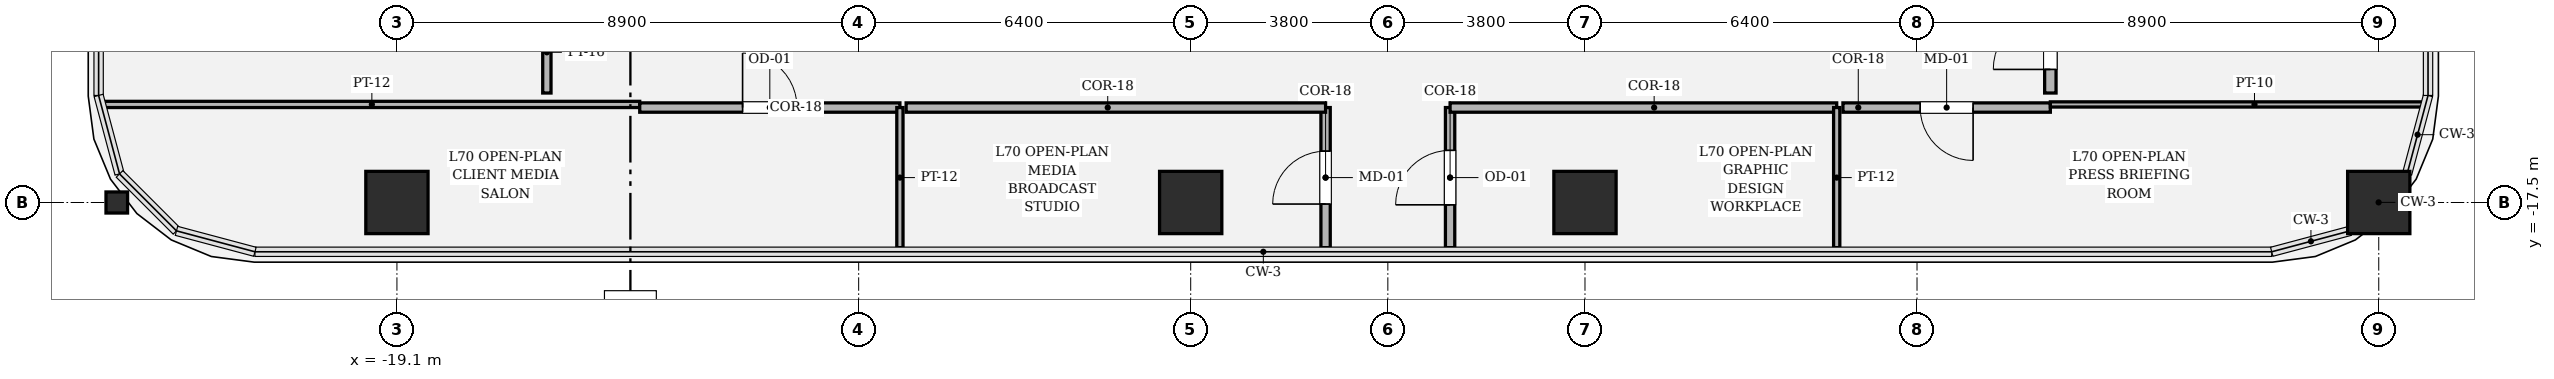
"""IFC4 building model, lengths in metres.
Left out: names, types, materials, properties, quantities, classifications, styles, units other than length and angle.
Written with IfcOpenShell. Run it as: python <this file> out.ifc"""

import sys

from ifc_helpers import new_model, si_unit, direction, frame, frame_2d, origin, origin_2d, place, context, subcontext, project, spatial, rectangle, hollow_rectangle, i_section, extrude, element, fill, save


model = new_model("IFC4")
c1 = context("Model", 3, precision=1e-05, world=origin(), true_north=direction((0.0, 1.0)))
c2 = subcontext(c1, "Body", "Model", "MODEL_VIEW")
j1 = project(units=[si_unit("LENGTHUNIT", "METRE"), si_unit("PLANEANGLEUNIT", "RADIAN")], contexts=[c1])
p1 = place(None, origin())
s1 = spatial("IfcSite", under=j1, at=p1, CompositionType="ELEMENT")
p2 = place(p1, origin())
s2 = spatial("IfcBuilding", under=s1, at=p2, CompositionType="ELEMENT")
p3 = place(p2, frame((0.0, 0.0, 296.4)))
s3 = spatial("IfcBuildingStorey", under=s2, at=p3, CompositionType="ELEMENT", Elevation=296.4)
for number, where, z_axis, x_axis in (
    (1, (-19.1, -17.5, 0.0), (0.0, 0.0, 1.0), (1.0, 0.0, 0.0)),
    (2, (-3.8, -17.5, 0.0), (0.0, 0.0, 1.0), (1.0, 0.0, 0.0)),
    (3, (3.8, -17.5, 0.0), (0.0, 0.0, 1.0), (1.0, 0.0, 0.0)),
    (4, (19.1, -17.5, 0.0), (0.0, 0.0, 1.0), (1.0, 0.0, 0.0)),
):
    element("IfcColumn", number, at=place(p3, frame(where, z_axis=z_axis, x_axis=x_axis)), inside=s3, PredefinedType="COLUMN", context=c2, shape_type="SweptSolid", body=[
        extrude(hollow_rectangle(XDim=1.2, YDim=1.2, WallThickness=0.035, at=origin_2d()), origin(), (0.0, 0.0, 1.0), 4.2),
    ])
p4 = place(p3, frame((-24.5, -17.5, 0.0), z_axis=(0.0, 0.0, 1.0), x_axis=(0.0, 1.0, 0.0)))
e5 = element("IfcColumn", 5, at=p4, inside=s3, PredefinedType="COLUMN", context=c2, shape_type="SweptSolid", body=[
    extrude(i_section(OverallWidth=0.406, OverallDepth=0.416, WebThickness=0.029, FlangeThickness=0.048, FilletRadius=0.018, at=origin_2d()), origin(), (0.0, 0.0, 1.0), 4.198),
])
p5 = place(p3, frame((-24.747, -15.61, 0.0), z_axis=(0.0, 0.0, 1.0), x_axis=(1.0, 0.0, 0.0)))
e6 = element("IfcWall", 6, at=p5, inside=s3, PredefinedType="PARTITIONING", context=c2, shape_type="SweptSolid", body=[
    extrude(rectangle(XDim=10.327, YDim=0.12, at=frame_2d((5.163, 0.0))), origin(), (0.0, 0.0, 1.0), 2.714),
])
p6 = place(p3, frame((-14.42, -15.67, 0.0), z_axis=(0.0, 0.0, 1.0), x_axis=(1.0, 0.0, 0.0)))
e7 = element("IfcWall", 7, at=p6, inside=s3, PredefinedType="PARTITIONING", context=c2, shape_type="SweptSolid", body=[
    extrude(rectangle(XDim=5.015, YDim=0.18, at=frame_2d((2.507, 0.0))), origin(), (0.0, 0.0, 1.0), 3.394),
])
p7 = place(p6, frame((1.982, 0.0, 0.0)))
e8 = element("IfcOpeningElement", 8, at=p7, cuts=e7, PredefinedType="OPENING", context=c2, shape_type="SweptSolid", body=[
    extrude(rectangle(XDim=1.05, YDim=2.2, at=frame_2d((0.525, 1.1))), frame((0.0, 0.1, 0.0), z_axis=(0.0, -1.0, 0.0), x_axis=(1.0, 0.0, 0.0)), (0.0, 0.0, 1.0), 0.2),
])
p8 = place(p3, frame((-9.405, -15.67, 0.0), z_axis=(0.0, 0.0, 1.0), x_axis=(0.0, -1.0, 0.0)))
e9 = element("IfcWall", 9, at=p8, inside=s3, PredefinedType="PARTITIONING", context=c2, shape_type="SweptSolid", body=[
    extrude(rectangle(XDim=2.7, YDim=0.12, at=frame_2d((1.35, 0.0))), origin(), (0.0, 0.0, 1.0), 3.394),
])
p9 = place(p3, frame((-1.2, -15.67, 0.0), z_axis=(0.0, 0.0, 1.0), x_axis=(0.0, -1.0, 0.0)))
e10 = element("IfcWall", 10, at=p9, inside=s3, PredefinedType="PARTITIONING", context=c2, shape_type="SweptSolid", body=[
    extrude(rectangle(XDim=2.7, YDim=0.18, at=frame_2d((1.35, 0.0))), origin(), (0.0, 0.0, 1.0), 3.394),
])
p10 = place(p9, frame((0.84, 0.0, 0.0)))
e11 = element("IfcOpeningElement", 11, at=p10, cuts=e10, PredefinedType="OPENING", context=c2, shape_type="SweptSolid", body=[
    extrude(rectangle(XDim=1.02, YDim=2.2, at=frame_2d((0.51, 1.1))), frame((0.0, 0.1, 0.0), z_axis=(0.0, -1.0, 0.0), x_axis=(1.0, 0.0, 0.0)), (0.0, 0.0, 1.0), 0.2),
])
p11 = place(p3, frame((-9.285, -15.67, 0.0), z_axis=(0.0, 0.0, 1.0), x_axis=(1.0, 0.0, 0.0)))
e12 = element("IfcWall", 12, at=p11, inside=s3, PredefinedType="PARTITIONING", context=c2, shape_type="SweptSolid", body=[
    extrude(rectangle(XDim=8.085, YDim=0.18, at=frame_2d((4.042, 0.0))), origin(), (0.0, 0.0, 1.0), 3.394),
])
p12 = place(p3, frame((1.2, -18.37, 0.0), z_axis=(0.0, 0.0, 1.0), x_axis=(0.0, 1.0, 0.0)))
e13 = element("IfcWall", 13, at=p12, inside=s3, PredefinedType="PARTITIONING", context=c2, shape_type="SweptSolid", body=[
    extrude(rectangle(XDim=2.7, YDim=0.18, at=frame_2d((1.35, 0.0))), origin(), (0.0, 0.0, 1.0), 3.394),
])
p13 = place(p12, frame((0.825, 0.0, 0.0)))
e14 = element("IfcOpeningElement", 14, at=p13, cuts=e13, PredefinedType="OPENING", context=c2, shape_type="SweptSolid", body=[
    extrude(rectangle(XDim=1.05, YDim=2.2, at=frame_2d((0.525, 1.1))), frame((0.0, 0.1, 0.0), z_axis=(0.0, -1.0, 0.0), x_axis=(1.0, 0.0, 0.0)), (0.0, 0.0, 1.0), 0.2),
])
p14 = place(p3, frame((1.2, -15.67, 0.0), z_axis=(0.0, 0.0, 1.0), x_axis=(1.0, 0.0, 0.0)))
e15 = element("IfcWall", 15, at=p14, inside=s3, PredefinedType="PARTITIONING", context=c2, shape_type="SweptSolid", body=[
    extrude(rectangle(XDim=7.452, YDim=0.18, at=frame_2d((3.726, 0.0))), origin(), (0.0, 0.0, 1.0), 3.394),
])
p15 = place(p3, frame((8.652, -15.67, 0.0), z_axis=(0.0, 0.0, 1.0), x_axis=(0.0, -1.0, 0.0)))
e16 = element("IfcWall", 16, at=p15, inside=s3, PredefinedType="PARTITIONING", context=c2, shape_type="SweptSolid", body=[
    extrude(rectangle(XDim=2.7, YDim=0.12, at=frame_2d((1.35, 0.0))), origin(), (0.0, 0.0, 1.0), 3.394),
])
p16 = place(p3, frame((8.772, -15.67, 0.0), z_axis=(0.0, 0.0, 1.0), x_axis=(1.0, 0.0, 0.0)))
e17 = element("IfcWall", 17, at=p16, inside=s3, PredefinedType="PARTITIONING", context=c2, shape_type="SweptSolid", body=[
    extrude(rectangle(XDim=3.998, YDim=0.18, at=frame_2d((1.999, 0.0))), origin(), (0.0, 0.0, 1.0), 3.394),
])
p17 = place(p16, frame((1.489, 0.0, 0.0)))
e18 = element("IfcOpeningElement", 18, at=p17, cuts=e17, PredefinedType="OPENING", context=c2, shape_type="SweptSolid", body=[
    extrude(rectangle(XDim=1.02, YDim=2.2, at=frame_2d((0.51, 1.1))), frame((0.0, 0.1, 0.0), z_axis=(0.0, -1.0, 0.0), x_axis=(1.0, 0.0, 0.0)), (0.0, 0.0, 1.0), 0.2),
])
p18 = place(p3, frame((12.77, -15.61, 0.0), z_axis=(0.0, 0.0, 1.0), x_axis=(1.0, 0.0, 0.0)))
e19 = element("IfcWall", 19, at=p18, inside=s3, PredefinedType="PARTITIONING", context=c2, shape_type="SweptSolid", body=[
    extrude(rectangle(XDim=7.177, YDim=0.1, at=frame_2d((3.588, 0.0))), origin(), (0.0, 0.0, 1.0), 3.394),
])
p19 = place(p3, frame((-16.21, -13.82, 0.0), z_axis=(0.0, 0.0, 1.0), x_axis=(0.0, -1.0, 0.0)))
e20 = element("IfcWall", 20, at=p19, inside=s3, PredefinedType="PARTITIONING", context=c2, shape_type="SweptSolid", body=[
    extrude(rectangle(XDim=1.57, YDim=0.16, at=frame_2d((0.785, 0.0))), origin(), (0.0, 0.0, 1.0), 4.0),
])
p20 = place(p3, frame((12.77, -15.39, 0.0), z_axis=(0.0, 0.0, 1.0), x_axis=(0.0, 1.0, 0.0)))
e21 = element("IfcWall", 21, at=p20, inside=s3, PredefinedType="SOLIDWALL", context=c2, shape_type="SweptSolid", body=[
    extrude(rectangle(XDim=2.01, YDim=0.22, at=frame_2d((1.005, 0.0))), origin(), (0.0, 0.0, 1.0), 3.634),
])
p21 = place(p20, frame((0.455, 0.0, 0.0)))
e22 = element("IfcOpeningElement", 22, at=p21, cuts=e21, PredefinedType="OPENING", context=c2, shape_type="SweptSolid", body=[
    extrude(rectangle(XDim=1.1, YDim=2.2, at=frame_2d((0.55, 1.1))), frame((0.0, 0.12, 0.0), z_axis=(0.0, -1.0, 0.0), x_axis=(1.0, 0.0, 0.0)), (0.0, 0.0, 1.0), 0.24),
])
p22 = place(p7, origin())
e23 = element("IfcDoor", 23, at=p22, inside=s3, OperationType="SINGLE_SWING_LEFT", PredefinedType="DOOR", context=c2, shape_type="SweptSolid", body=[
    extrude(rectangle(XDim=1.05, YDim=2.2, at=frame_2d((0.525, 1.1))), frame((0.0, 0.025, 0.0), z_axis=(0.0, -1.0, 0.0), x_axis=(1.0, 0.0, 0.0)), (0.0, 0.0, 1.0), 0.05),
])
fill(e8, e23)
p23 = place(p10, origin())
e24 = element("IfcDoor", 24, at=p23, inside=s3, OperationType="SINGLE_SWING_RIGHT", PredefinedType="DOOR", context=c2, shape_type="SweptSolid", body=[
    extrude(rectangle(XDim=1.02, YDim=2.2, at=frame_2d((0.51, 1.1))), frame((0.0, 0.025, 0.0), z_axis=(0.0, -1.0, 0.0), x_axis=(1.0, 0.0, 0.0)), (0.0, 0.0, 1.0), 0.05),
])
fill(e11, e24)
p24 = place(p13, origin())
e25 = element("IfcDoor", 25, at=p24, inside=s3, OperationType="SINGLE_SWING_LEFT", PredefinedType="DOOR", context=c2, shape_type="SweptSolid", body=[
    extrude(rectangle(XDim=1.05, YDim=2.2, at=frame_2d((0.525, 1.1))), frame((0.0, 0.025, 0.0), z_axis=(0.0, -1.0, 0.0), x_axis=(1.0, 0.0, 0.0)), (0.0, 0.0, 1.0), 0.05),
])
fill(e14, e25)
p25 = place(p17, origin())
e26 = element("IfcDoor", 26, at=p25, inside=s3, OperationType="SINGLE_SWING_RIGHT", PredefinedType="DOOR", context=c2, shape_type="SweptSolid", body=[
    extrude(rectangle(XDim=1.02, YDim=2.2, at=frame_2d((0.51, 1.1))), frame((0.0, 0.025, 0.0), z_axis=(0.0, -1.0, 0.0), x_axis=(1.0, 0.0, 0.0)), (0.0, 0.0, 1.0), 0.05),
])
fill(e18, e26)
p26 = place(p21, origin())
e27 = element("IfcDoor", 27, at=p26, inside=s3, OperationType="SINGLE_SWING_LEFT", PredefinedType="DOOR", context=c2, shape_type="SweptSolid", body=[
    extrude(rectangle(XDim=1.1, YDim=2.2, at=frame_2d((0.55, 1.1))), frame((0.0, 0.025, 0.0), z_axis=(0.0, -1.0, 0.0), x_axis=(1.0, 0.0, 0.0)), (0.0, 0.0, 1.0), 0.05),
])
fill(e22, e27)
save(model, sys.argv[1])
